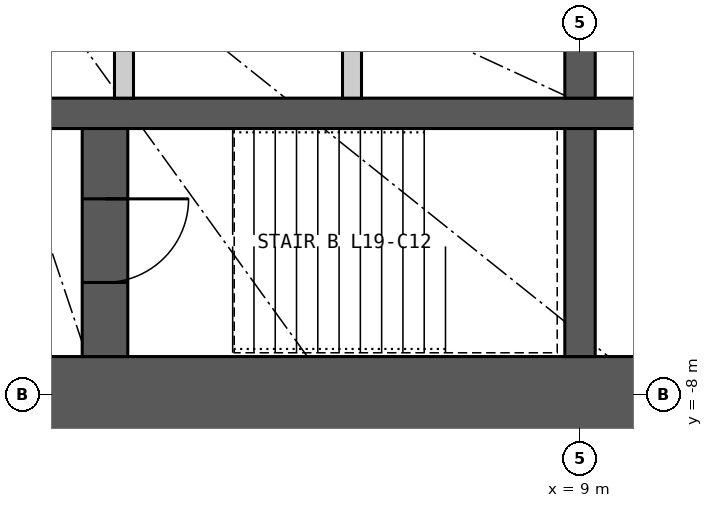
"""IFC4 building model, lengths in metres.
Left out: names, types, materials, properties, quantities, classifications, styles, units other than length and angle.
Written with IfcOpenShell. Run it as: python <this file> out.ifc"""

import sys

from ifc_helpers import new_model, si_unit, direction, frame, frame_2d, origin, place, context, subcontext, project, spatial, rectangle, extrude, element, fill, save


model = new_model("IFC4")
c1 = context("Model", 3, precision=1e-05, world=origin(), true_north=direction((0.0, 1.0)))
c2 = subcontext(c1, "Body", "Model", "MODEL_VIEW")
j1 = project(units=[si_unit("LENGTHUNIT", "METRE"), si_unit("PLANEANGLEUNIT", "RADIAN")], contexts=[c1])
p1 = place(None, origin())
s1 = spatial("IfcSite", under=j1, at=p1, CompositionType="ELEMENT")
p2 = place(p1, origin())
s2 = spatial("IfcBuilding", under=s1, at=p2, CompositionType="ELEMENT")
p3 = place(p2, frame((0.0, 0.0, 77.1)))
s3 = spatial("IfcBuildingStorey", under=s2, at=p3, CompositionType="ELEMENT", Elevation=77.1)
p4 = place(p3, frame((12.5, -8.0, 0.0), z_axis=(0.0, 0.0, 1.0), x_axis=(-1.0, 0.0, 0.0)))
e1 = element("IfcWall", 1, at=p4, inside=s3, PredefinedType="SHEAR", context=c2, shape_type="SweptSolid", body=[
    extrude(rectangle(XDim=25.0, YDim=1.0, at=frame_2d((12.5, 0.0))), origin(), (0.0, 0.0, 1.0), 3.3),
])
p5 = place(p4, frame((11.2, 0.0, 0.0)))
e2 = element("IfcOpeningElement", 2, at=p5, cuts=e1, PredefinedType="OPENING", context=c2, shape_type="SweptSolid", body=[
    extrude(rectangle(XDim=1.2, YDim=2.2, at=frame_2d((0.6, 1.1))), frame((0.0, 0.51, 0.0), z_axis=(0.0, -1.0, 0.0), x_axis=(1.0, 0.0, 0.0)), (0.0, 0.0, 1.0), 1.02),
])
p6 = place(p4, frame((18.8, 0.0, 0.0)))
e3 = element("IfcOpeningElement", 3, at=p6, cuts=e1, PredefinedType="OPENING", context=c2, shape_type="SweptSolid", body=[
    extrude(rectangle(XDim=0.9, YDim=2.2, at=frame_2d((0.45, 1.1))), frame((0.0, 0.51, 0.0), z_axis=(0.0, -1.0, 0.0), x_axis=(1.0, 0.0, 0.0)), (0.0, 0.0, 1.0), 1.02),
])
p7 = place(p3, frame((-11.5, -4.3, 0.0), z_axis=(0.0, 0.0, 1.0), x_axis=(1.0, 0.0, 0.0)))
e4 = element("IfcWall", 4, at=p7, inside=s3, PredefinedType="SHEAR", context=c2, shape_type="SweptSolid", body=[
    extrude(rectangle(XDim=23.0, YDim=0.4, at=frame_2d((11.5, 0.0))), origin(), (0.0, 0.0, 1.0), 3.3),
])
p8 = place(p3, frame((9.0, -4.1, 0.0), z_axis=(0.0, 0.0, 1.0), x_axis=(0.0, 1.0, 0.0)))
e5 = element("IfcWall", 5, at=p8, inside=s3, PredefinedType="SHEAR", context=c2, shape_type="SweptSolid", body=[
    extrude(rectangle(XDim=2.35, YDim=0.4, at=frame_2d((1.175, 0.0))), origin(), (0.0, 0.0, 1.0), 3.3),
])
p9 = place(p3, frame((9.0, -7.5, 0.0), z_axis=(0.0, 0.0, 1.0), x_axis=(0.0, 1.0, 0.0)))
e6 = element("IfcWall", 6, at=p9, inside=s3, PredefinedType="SHEAR", context=c2, shape_type="SweptSolid", body=[
    extrude(rectangle(XDim=3.0, YDim=0.4, at=frame_2d((1.5, 0.0))), origin(), (0.0, 0.0, 1.0), 3.3),
])
p10 = place(p3, frame((2.75, -7.5, 0.0), z_axis=(0.0, 0.0, 1.0), x_axis=(0.0, 1.0, 0.0)))
e7 = element("IfcWall", 7, at=p10, inside=s3, PredefinedType="SHEAR", context=c2, shape_type="SweptSolid", body=[
    extrude(rectangle(XDim=3.0, YDim=0.6, at=frame_2d((1.5, 0.0))), origin(), (0.0, 0.0, 1.0), 3.3),
])
p11 = place(p10, frame((0.975, 0.0, 0.0)))
e8 = element("IfcOpeningElement", 8, at=p11, cuts=e7, PredefinedType="OPENING", context=c2, shape_type="SweptSolid", body=[
    extrude(rectangle(XDim=1.1, YDim=2.2, at=frame_2d((0.55, 1.1))), frame((0.0, 0.31, 0.0), z_axis=(0.0, -1.0, 0.0), x_axis=(1.0, 0.0, 0.0)), (0.0, 0.0, 1.0), 0.62),
])
for number, where, z_axis, x_axis in (
    (9, (3.0, -4.1, 0.0), (0.0, 0.0, 1.0), (0.0, 1.0, 0.0)),
    (10, (6.0, -4.1, 0.0), (0.0, 0.0, 1.0), (0.0, 1.0, 0.0)),
):
    element("IfcWall", number, at=place(p3, frame(where, z_axis=z_axis, x_axis=x_axis)), inside=s3, PredefinedType="PARTITIONING", context=c2, shape_type="SweptSolid", body=[
        extrude(rectangle(XDim=2.35, YDim=0.25, at=frame_2d((1.175, 0.0))), origin(), (0.0, 0.0, 1.0), 3.3),
    ])
p12 = place(p11, origin())
e11 = element("IfcDoor", 11, at=p12, inside=s3, OperationType="SINGLE_SWING_RIGHT", PredefinedType="DOOR", context=c2, shape_type="SweptSolid", body=[
    extrude(rectangle(XDim=1.1, YDim=2.2, at=frame_2d((0.55, 1.1))), frame((0.0, 0.025, 0.0), z_axis=(0.0, -1.0, 0.0), x_axis=(1.0, 0.0, 0.0)), (0.0, 0.0, 1.0), 0.05),
])
fill(e8, e11)
save(model, sys.argv[1])
